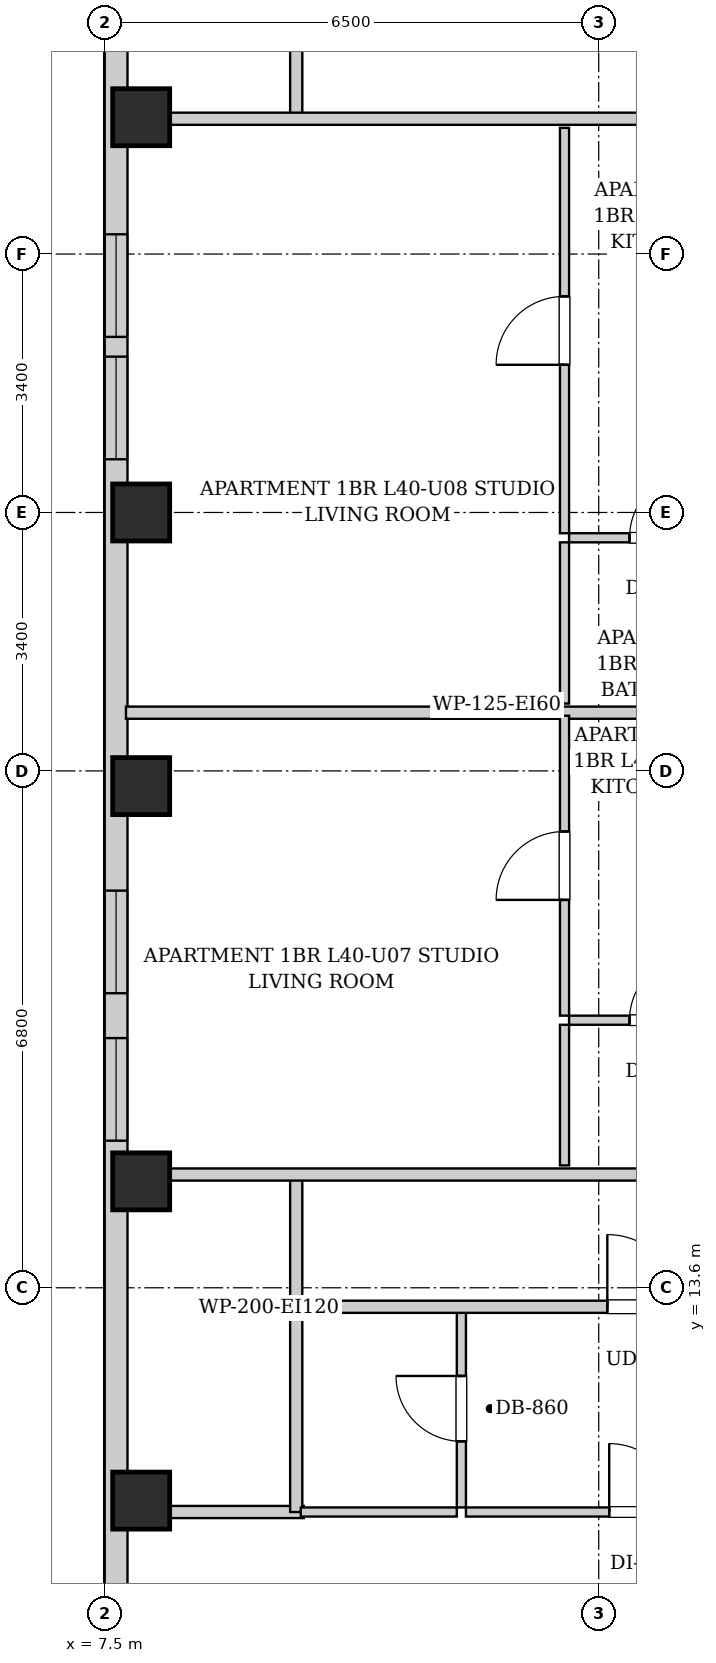
"""IFC4 building model, lengths in metres.
Left out: names, types, materials, properties, quantities, classifications, styles, units other than length and angle.
Written with IfcOpenShell. Run it as: python <this file> out.ifc"""

import sys

from ifc_helpers import new_model, si_unit, direction, frame, frame_2d, origin, origin_2d, place, context, subcontext, project, spatial, rectangle, extrude, element, fill, save


model = new_model("IFC4")
c1 = context("Model", 3, precision=1e-05, world=origin(), true_north=direction((0.0, 1.0)))
c2 = subcontext(c1, "Body", "Model", "MODEL_VIEW")
j1 = project(units=[si_unit("LENGTHUNIT", "METRE"), si_unit("PLANEANGLEUNIT", "RADIAN")], contexts=[c1])
p1 = place(None, origin())
s1 = spatial("IfcSite", under=j1, at=p1, CompositionType="ELEMENT")
p2 = place(p1, origin())
s2 = spatial("IfcBuilding", under=s1, at=p2, CompositionType="ELEMENT")
p3 = place(p2, frame((0.0, 0.0, 140.65)))
s3 = spatial("IfcBuildingStorey", under=s2, at=p3, CompositionType="ELEMENT", Elevation=140.65)
for number, where, z_axis, x_axis in (
    (1, (7.98, 10.8, 0.0), (0.0, 0.0, 1.0), (1.0, 0.0, 0.0)),
    (2, (7.98, 15.0, 0.0), (0.0, 0.0, 1.0), (1.0, 0.0, 0.0)),
    (3, (7.98, 20.2, 0.0), (0.0, 0.0, 1.0), (1.0, 0.0, 0.0)),
    (4, (7.98, 23.8, 0.0), (0.0, 0.0, 1.0), (1.0, 0.0, 0.0)),
    (5, (7.98, 29.0, 0.0), (0.0, 0.0, 1.0), (1.0, 0.0, 0.0)),
):
    element("IfcColumn", number, at=place(p3, frame(where, z_axis=z_axis, x_axis=x_axis)), inside=s3, PredefinedType="COLUMN", context=c2, shape_type="SweptSolid", body=[
        extrude(rectangle(XDim=0.75, YDim=0.75, at=origin_2d()), origin(), (0.0, 0.0, 1.0), 3.25),
    ])
p4 = place(p3, frame((7.65, 6.3, 0.0), z_axis=(0.0, 0.0, 1.0), x_axis=(0.0, 1.0, 0.0)))
e6 = element("IfcWall", 6, at=p4, inside=s3, PredefinedType="SOLIDWALL", context=c2, shape_type="SweptSolid", body=[
    extrude(rectangle(XDim=34.5, YDim=0.3, at=frame_2d((17.25, 0.0))), origin(), (0.0, 0.0, 1.0), 2.99),
])
p5 = place(p4, frame((1.575, 0.0, 0.55)))
e7 = element("IfcOpeningElement", 7, at=p5, cuts=e6, PredefinedType="OPENING", context=c2, shape_type="SweptSolid", body=[
    extrude(rectangle(XDim=1.35, YDim=1.2, at=frame_2d((0.675, 0.6))), frame((0.0, 0.16, 0.0), z_axis=(0.0, -1.0, 0.0), x_axis=(1.0, 0.0, 0.0)), (0.0, 0.0, 1.0), 0.32),
])
p6 = place(p4, frame((30.075, 0.0, 0.55)))
e8 = element("IfcOpeningElement", 8, at=p6, cuts=e6, PredefinedType="OPENING", context=c2, shape_type="SweptSolid", body=[
    extrude(rectangle(XDim=1.35, YDim=1.2, at=frame_2d((0.675, 0.6))), frame((0.0, 0.16, 0.0), z_axis=(0.0, -1.0, 0.0), x_axis=(1.0, 0.0, 0.0)), (0.0, 0.0, 1.0), 0.32),
])
p7 = place(p4, frame((28.235, 0.0, 0.55)))
e9 = element("IfcOpeningElement", 9, at=p7, cuts=e6, PredefinedType="OPENING", context=c2, shape_type="SweptSolid", body=[
    extrude(rectangle(XDim=1.35, YDim=1.2, at=frame_2d((0.675, 0.6))), frame((0.0, 0.16, 0.0), z_axis=(0.0, -1.0, 0.0), x_axis=(1.0, 0.0, 0.0)), (0.0, 0.0, 1.0), 0.32),
])
p8 = place(p4, frame((11.175, 0.0, 0.55)))
e10 = element("IfcOpeningElement", 10, at=p8, cuts=e6, PredefinedType="OPENING", context=c2, shape_type="SweptSolid", body=[
    extrude(rectangle(XDim=1.35, YDim=1.2, at=frame_2d((0.675, 0.6))), frame((0.0, 0.16, 0.0), z_axis=(0.0, -1.0, 0.0), x_axis=(1.0, 0.0, 0.0)), (0.0, 0.0, 1.0), 0.32),
])
p9 = place(p4, frame((9.235, 0.0, 0.55)))
e11 = element("IfcOpeningElement", 11, at=p9, cuts=e6, PredefinedType="OPENING", context=c2, shape_type="SweptSolid", body=[
    extrude(rectangle(XDim=1.35, YDim=1.2, at=frame_2d((0.675, 0.6))), frame((0.0, 0.16, 0.0), z_axis=(0.0, -1.0, 0.0), x_axis=(1.0, 0.0, 0.0)), (0.0, 0.0, 1.0), 0.32),
])
p10 = place(p4, frame((18.2, 0.0, 0.55)))
e12 = element("IfcOpeningElement", 12, at=p10, cuts=e6, PredefinedType="OPENING", context=c2, shape_type="SweptSolid", body=[
    extrude(rectangle(XDim=1.35, YDim=1.2, at=frame_2d((0.675, 0.6))), frame((0.0, 0.16, 0.0), z_axis=(0.0, -1.0, 0.0), x_axis=(1.0, 0.0, 0.0)), (0.0, 0.0, 1.0), 0.32),
])
p11 = place(p4, frame((19.81, 0.0, 0.55)))
e13 = element("IfcOpeningElement", 13, at=p11, cuts=e6, PredefinedType="OPENING", context=c2, shape_type="SweptSolid", body=[
    extrude(rectangle(XDim=1.35, YDim=1.2, at=frame_2d((0.675, 0.6))), frame((0.0, 0.16, 0.0), z_axis=(0.0, -1.0, 0.0), x_axis=(1.0, 0.0, 0.0)), (0.0, 0.0, 1.0), 0.32),
])
for number, where, z_axis, x_axis in (
    (14, (10.02, 13.35, 0.0), (0.0, 0.0, 1.0), (0.0, 1.0, 0.0)),
    (15, (10.02, 28.98, 0.0), (0.0, 0.0, 1.0), (0.0, 1.0, 0.0)),
):
    element("IfcWall", number, at=place(p3, frame(where, z_axis=z_axis, x_axis=x_axis)), inside=s3, PredefinedType="PARTITIONING", context=c2, shape_type="SweptSolid", body=[
        extrude(rectangle(XDim=1.74, YDim=0.16, at=frame_2d((0.87, 0.0))), origin(), (0.0, 0.0, 1.0), 2.99),
    ])
for number, where, z_axis, x_axis in (
    (16, (7.78, 15.09, 0.0), (0.0, 0.0, 1.0), (1.0, 0.0, 0.0)),
    (17, (7.78, 28.98, 0.0), (0.0, 0.0, 1.0), (1.0, 0.0, 0.0)),
):
    element("IfcWall", number, at=place(p3, frame(where, z_axis=z_axis, x_axis=x_axis)), inside=s3, PredefinedType="PARTITIONING", context=c2, shape_type="SweptSolid", body=[
        extrude(rectangle(XDim=8.36, YDim=0.16, at=frame_2d((4.18, 0.0))), origin(), (0.0, 0.0, 1.0), 2.426),
    ])
p12 = place(p3, frame((7.78, 10.65, 0.0), z_axis=(0.0, 0.0, 1.0), x_axis=(1.0, 0.0, 0.0)))
e18 = element("IfcWall", 18, at=p12, inside=s3, PredefinedType="PARTITIONING", context=c2, shape_type="SweptSolid", body=[
    extrude(rectangle(XDim=2.34, YDim=0.16, at=frame_2d((1.17, 0.0))), origin(), (0.0, 0.0, 1.0), 2.99),
])
p13 = place(p3, frame((10.02, 10.65, 0.0), z_axis=(0.0, 0.0, 1.0), x_axis=(0.0, 1.0, 0.0)))
e19 = element("IfcWall", 19, at=p13, inside=s3, PredefinedType="PARTITIONING", context=c2, shape_type="SweptSolid", body=[
    extrude(rectangle(XDim=2.66, YDim=0.16, at=frame_2d((1.33, 0.0))), origin(), (0.0, 0.0, 1.0), 2.99),
])
p14 = place(p3, frame((12.193, 10.71, 0.0), z_axis=(0.0, 0.0, 1.0), x_axis=(0.0, 1.0, 0.0)))
e20 = element("IfcWall", 20, at=p14, inside=s3, PredefinedType="PARTITIONING", context=c2, shape_type="SweptSolid", body=[
    extrude(rectangle(XDim=2.6, YDim=0.12, at=frame_2d((1.3, 0.0))), origin(), (0.0, 0.0, 1.0), 2.99),
])
p15 = place(p14, frame((0.87, 0.0, 0.0)))
e21 = element("IfcOpeningElement", 21, at=p15, cuts=e20, PredefinedType="OPENING", context=c2, shape_type="SweptSolid", body=[
    extrude(rectangle(XDim=0.86, YDim=2.05, at=frame_2d((0.43, 1.025))), frame((0.0, 0.07, 0.0), z_axis=(0.0, -1.0, 0.0), x_axis=(1.0, 0.0, 0.0)), (0.0, 0.0, 1.0), 0.14),
])
p16 = place(p3, frame((10.08, 10.65, 0.0), z_axis=(0.0, 0.0, 1.0), x_axis=(1.0, 0.0, 0.0)))
e22 = element("IfcWall", 22, at=p16, inside=s3, PredefinedType="PARTITIONING", context=c2, shape_type="SweptSolid", body=[
    extrude(rectangle(XDim=2.053, YDim=0.12, at=frame_2d((1.026, 0.0))), origin(), (0.0, 0.0, 1.0), 2.99),
])
p17 = place(p3, frame((12.253, 10.65, 0.0), z_axis=(0.0, 0.0, 1.0), x_axis=(1.0, 0.0, 0.0)))
e23 = element("IfcWall", 23, at=p17, inside=s3, PredefinedType="PARTITIONING", context=c2, shape_type="SweptSolid", body=[
    extrude(rectangle(XDim=4.671, YDim=0.12, at=frame_2d((2.335, 0.0))), origin(), (0.0, 0.0, 1.0), 2.99),
])
p18 = place(p17, frame((1.885, 0.0, 0.0)))
e24 = element("IfcOpeningElement", 24, at=p18, cuts=e23, PredefinedType="OPENING", context=c2, shape_type="SweptSolid", body=[
    extrude(rectangle(XDim=0.9, YDim=2.05, at=frame_2d((0.45, 1.025))), frame((0.0, 0.07, 0.0), z_axis=(0.0, -1.0, 0.0), x_axis=(1.0, 0.0, 0.0)), (0.0, 0.0, 1.0), 0.14),
])
p19 = place(p3, frame((7.78, 21.166, 0.0), z_axis=(0.0, 0.0, 1.0), x_axis=(1.0, 0.0, 0.0)))
e25 = element("IfcWall", 25, at=p19, inside=s3, PredefinedType="PARTITIONING", context=c2, shape_type="SweptSolid", body=[
    extrude(rectangle(XDim=8.28, YDim=0.16, at=frame_2d((4.14, 0.0))), origin(), (0.0, 0.0, 1.0), 2.99),
])
p20 = place(p3, frame((13.61, 17.12, 0.0), z_axis=(0.0, 0.0, 1.0), x_axis=(1.0, 0.0, 0.0)))
e26 = element("IfcWall", 26, at=p20, inside=s3, PredefinedType="PARTITIONING", context=c2, shape_type="SweptSolid", body=[
    extrude(rectangle(XDim=2.45, YDim=0.12, at=frame_2d((1.225, 0.0))), origin(), (0.0, 0.0, 1.0), 2.99),
])
p21 = place(p20, frame((0.795, 0.0, 0.0)))
e27 = element("IfcOpeningElement", 27, at=p21, cuts=e26, PredefinedType="OPENING", context=c2, shape_type="SweptSolid", body=[
    extrude(rectangle(XDim=0.86, YDim=2.05, at=frame_2d((0.43, 1.025))), frame((0.0, 0.07, 0.0), z_axis=(0.0, -1.0, 0.0), x_axis=(1.0, 0.0, 0.0)), (0.0, 0.0, 1.0), 0.14),
])
p22 = place(p3, frame((13.55, 15.21, 0.0), z_axis=(0.0, 0.0, 1.0), x_axis=(0.0, 1.0, 0.0)))
e28 = element("IfcWall", 28, at=p22, inside=s3, PredefinedType="PARTITIONING", context=c2, shape_type="SweptSolid", body=[
    extrude(rectangle(XDim=1.85, YDim=0.12, at=frame_2d((0.925, 0.0))), origin(), (0.0, 0.0, 1.0), 2.99),
])
p23 = place(p3, frame((13.55, 17.18, 0.0), z_axis=(0.0, 0.0, 1.0), x_axis=(0.0, 1.0, 0.0)))
e29 = element("IfcWall", 29, at=p23, inside=s3, PredefinedType="PARTITIONING", context=c2, shape_type="SweptSolid", body=[
    extrude(rectangle(XDim=3.946, YDim=0.12, at=frame_2d((1.973, 0.0))), origin(), (0.0, 0.0, 1.0), 2.99),
])
p24 = place(p23, frame((1.523, 0.0, 0.0)))
e30 = element("IfcOpeningElement", 30, at=p24, cuts=e29, PredefinedType="OPENING", context=c2, shape_type="SweptSolid", body=[
    extrude(rectangle(XDim=0.9, YDim=2.05, at=frame_2d((0.45, 1.025))), frame((0.0, 0.07, 0.0), z_axis=(0.0, -1.0, 0.0), x_axis=(1.0, 0.0, 0.0)), (0.0, 0.0, 1.0), 0.14),
])
p25 = place(p3, frame((13.61, 23.467, 0.0), z_axis=(0.0, 0.0, 1.0), x_axis=(1.0, 0.0, 0.0)))
e31 = element("IfcWall", 31, at=p25, inside=s3, PredefinedType="PARTITIONING", context=c2, shape_type="SweptSolid", body=[
    extrude(rectangle(XDim=2.45, YDim=0.12, at=frame_2d((1.225, 0.0))), origin(), (0.0, 0.0, 1.0), 2.99),
])
p26 = place(p25, frame((0.795, 0.0, 0.0)))
e32 = element("IfcOpeningElement", 32, at=p26, cuts=e31, PredefinedType="OPENING", context=c2, shape_type="SweptSolid", body=[
    extrude(rectangle(XDim=0.86, YDim=2.05, at=frame_2d((0.43, 1.025))), frame((0.0, 0.07, 0.0), z_axis=(0.0, -1.0, 0.0), x_axis=(1.0, 0.0, 0.0)), (0.0, 0.0, 1.0), 0.14),
])
p27 = place(p3, frame((13.55, 21.286, 0.0), z_axis=(0.0, 0.0, 1.0), x_axis=(0.0, 1.0, 0.0)))
e33 = element("IfcWall", 33, at=p27, inside=s3, PredefinedType="PARTITIONING", context=c2, shape_type="SweptSolid", body=[
    extrude(rectangle(XDim=2.121, YDim=0.12, at=frame_2d((1.061, 0.0))), origin(), (0.0, 0.0, 1.0), 2.99),
])
p28 = place(p3, frame((13.55, 23.527, 0.0), z_axis=(0.0, 0.0, 1.0), x_axis=(0.0, 1.0, 0.0)))
e34 = element("IfcWall", 34, at=p28, inside=s3, PredefinedType="PARTITIONING", context=c2, shape_type="SweptSolid", body=[
    extrude(rectangle(XDim=5.333, YDim=0.12, at=frame_2d((2.667, 0.0))), origin(), (0.0, 0.0, 1.0), 2.99),
])
p29 = place(p28, frame((2.216, 0.0, 0.0)))
e35 = element("IfcOpeningElement", 35, at=p29, cuts=e34, PredefinedType="OPENING", context=c2, shape_type="SweptSolid", body=[
    extrude(rectangle(XDim=0.9, YDim=2.05, at=frame_2d((0.45, 1.025))), frame((0.0, 0.07, 0.0), z_axis=(0.0, -1.0, 0.0), x_axis=(1.0, 0.0, 0.0)), (0.0, 0.0, 1.0), 0.14),
])
p30 = place(p3, frame((10.05, 13.35, 0.0), z_axis=(0.0, 0.0, 1.0), x_axis=(1.0, 0.0, 0.0)))
e36 = element("IfcWall", 36, at=p30, inside=s3, PredefinedType="PARTITIONING", context=c2, shape_type="SweptSolid", body=[
    extrude(rectangle(XDim=27.7, YDim=0.16, at=frame_2d((13.85, 0.0))), origin(), (0.0, 0.0, 1.0), 2.99),
])
p31 = place(p30, frame((4.063, 0.0, 0.0)))
e37 = element("IfcOpeningElement", 37, at=p31, cuts=e36, PredefinedType="OPENING", context=c2, shape_type="SweptSolid", body=[
    extrude(rectangle(XDim=0.95, YDim=2.1, at=frame_2d((0.475, 1.05))), frame((0.0, 0.09, 0.0), z_axis=(0.0, -1.0, 0.0), x_axis=(1.0, 0.0, 0.0)), (0.0, 0.0, 1.0), 0.18),
])
p32 = place(p30, frame((11.735, 0.0, 0.0)))
e38 = element("IfcOpeningElement", 38, at=p32, cuts=e36, PredefinedType="OPENING", context=c2, shape_type="SweptSolid", body=[
    extrude(rectangle(XDim=0.95, YDim=2.1, at=frame_2d((0.475, 1.05))), frame((0.0, 0.09, 0.0), z_axis=(0.0, -1.0, 0.0), x_axis=(1.0, 0.0, 0.0)), (0.0, 0.0, 1.0), 0.18),
])
p33 = place(p15, origin())
e39 = element("IfcDoor", 39, at=p33, inside=s3, OperationType="SINGLE_SWING_RIGHT", PredefinedType="DOOR", context=c2, shape_type="SweptSolid", body=[
    extrude(rectangle(XDim=0.86, YDim=2.05, at=frame_2d((0.43, 1.025))), frame((0.0, 0.025, 0.0), z_axis=(0.0, -1.0, 0.0), x_axis=(1.0, 0.0, 0.0)), (0.0, 0.0, 1.0), 0.05),
])
fill(e21, e39)
p34 = place(p18, origin())
e40 = element("IfcDoor", 40, at=p34, inside=s3, OperationType="SINGLE_SWING_LEFT", PredefinedType="DOOR", context=c2, shape_type="SweptSolid", body=[
    extrude(rectangle(XDim=0.9, YDim=2.05, at=frame_2d((0.45, 1.025))), frame((0.0, 0.025, 0.0), z_axis=(0.0, -1.0, 0.0), x_axis=(1.0, 0.0, 0.0)), (0.0, 0.0, 1.0), 0.05),
])
fill(e24, e40)
p35 = place(p21, origin())
e41 = element("IfcDoor", 41, at=p35, inside=s3, OperationType="SINGLE_SWING_RIGHT", PredefinedType="DOOR", context=c2, shape_type="SweptSolid", body=[
    extrude(rectangle(XDim=0.86, YDim=2.05, at=frame_2d((0.43, 1.025))), frame((0.0, 0.025, 0.0), z_axis=(0.0, -1.0, 0.0), x_axis=(1.0, 0.0, 0.0)), (0.0, 0.0, 1.0), 0.05),
])
fill(e27, e41)
p36 = place(p24, origin())
e42 = element("IfcDoor", 42, at=p36, inside=s3, OperationType="SINGLE_SWING_LEFT", PredefinedType="DOOR", context=c2, shape_type="SweptSolid", body=[
    extrude(rectangle(XDim=0.9, YDim=2.05, at=frame_2d((0.45, 1.025))), frame((0.0, 0.025, 0.0), z_axis=(0.0, -1.0, 0.0), x_axis=(1.0, 0.0, 0.0)), (0.0, 0.0, 1.0), 0.05),
])
fill(e30, e42)
p37 = place(p26, origin())
e43 = element("IfcDoor", 43, at=p37, inside=s3, OperationType="SINGLE_SWING_RIGHT", PredefinedType="DOOR", context=c2, shape_type="SweptSolid", body=[
    extrude(rectangle(XDim=0.86, YDim=2.05, at=frame_2d((0.43, 1.025))), frame((0.0, 0.025, 0.0), z_axis=(0.0, -1.0, 0.0), x_axis=(1.0, 0.0, 0.0)), (0.0, 0.0, 1.0), 0.05),
])
fill(e32, e43)
p38 = place(p29, origin())
e44 = element("IfcDoor", 44, at=p38, inside=s3, OperationType="SINGLE_SWING_LEFT", PredefinedType="DOOR", context=c2, shape_type="SweptSolid", body=[
    extrude(rectangle(XDim=0.9, YDim=2.05, at=frame_2d((0.45, 1.025))), frame((0.0, 0.025, 0.0), z_axis=(0.0, -1.0, 0.0), x_axis=(1.0, 0.0, 0.0)), (0.0, 0.0, 1.0), 0.05),
])
fill(e35, e44)
p39 = place(p31, origin())
e45 = element("IfcDoor", 45, at=p39, inside=s3, OperationType="SINGLE_SWING_LEFT", PredefinedType="DOOR", context=c2, shape_type="SweptSolid", body=[
    extrude(rectangle(XDim=0.95, YDim=2.1, at=frame_2d((0.475, 1.05))), frame((0.0, 0.025, 0.0), z_axis=(0.0, -1.0, 0.0), x_axis=(1.0, 0.0, 0.0)), (0.0, 0.0, 1.0), 0.05),
])
fill(e37, e45)
p40 = place(p8, origin())
e46 = element("IfcWindow", 46, at=p40, inside=s3, PartitioningType="SINGLE_PANEL", PredefinedType="WINDOW", context=c2, shape_type="SweptSolid", body=[
    extrude(rectangle(XDim=1.35, YDim=1.2, at=frame_2d((0.675, 0.6))), frame((0.0, 0.03, 0.0), z_axis=(0.0, -1.0, 0.0), x_axis=(1.0, 0.0, 0.0)), (0.0, 0.0, 1.0), 0.06),
])
fill(e10, e46)
p41 = place(p9, origin())
e47 = element("IfcWindow", 47, at=p41, inside=s3, PartitioningType="SINGLE_PANEL", PredefinedType="WINDOW", context=c2, shape_type="SweptSolid", body=[
    extrude(rectangle(XDim=1.35, YDim=1.2, at=frame_2d((0.675, 0.6))), frame((0.0, 0.03, 0.0), z_axis=(0.0, -1.0, 0.0), x_axis=(1.0, 0.0, 0.0)), (0.0, 0.0, 1.0), 0.06),
])
fill(e11, e47)
p42 = place(p10, origin())
e48 = element("IfcWindow", 48, at=p42, inside=s3, PartitioningType="SINGLE_PANEL", PredefinedType="WINDOW", context=c2, shape_type="SweptSolid", body=[
    extrude(rectangle(XDim=1.35, YDim=1.2, at=frame_2d((0.675, 0.6))), frame((0.0, 0.03, 0.0), z_axis=(0.0, -1.0, 0.0), x_axis=(1.0, 0.0, 0.0)), (0.0, 0.0, 1.0), 0.06),
])
fill(e12, e48)
p43 = place(p11, origin())
e49 = element("IfcWindow", 49, at=p43, inside=s3, PartitioningType="SINGLE_PANEL", PredefinedType="WINDOW", context=c2, shape_type="SweptSolid", body=[
    extrude(rectangle(XDim=1.35, YDim=1.2, at=frame_2d((0.675, 0.6))), frame((0.0, 0.03, 0.0), z_axis=(0.0, -1.0, 0.0), x_axis=(1.0, 0.0, 0.0)), (0.0, 0.0, 1.0), 0.06),
])
fill(e13, e49)
save(model, sys.argv[1])
